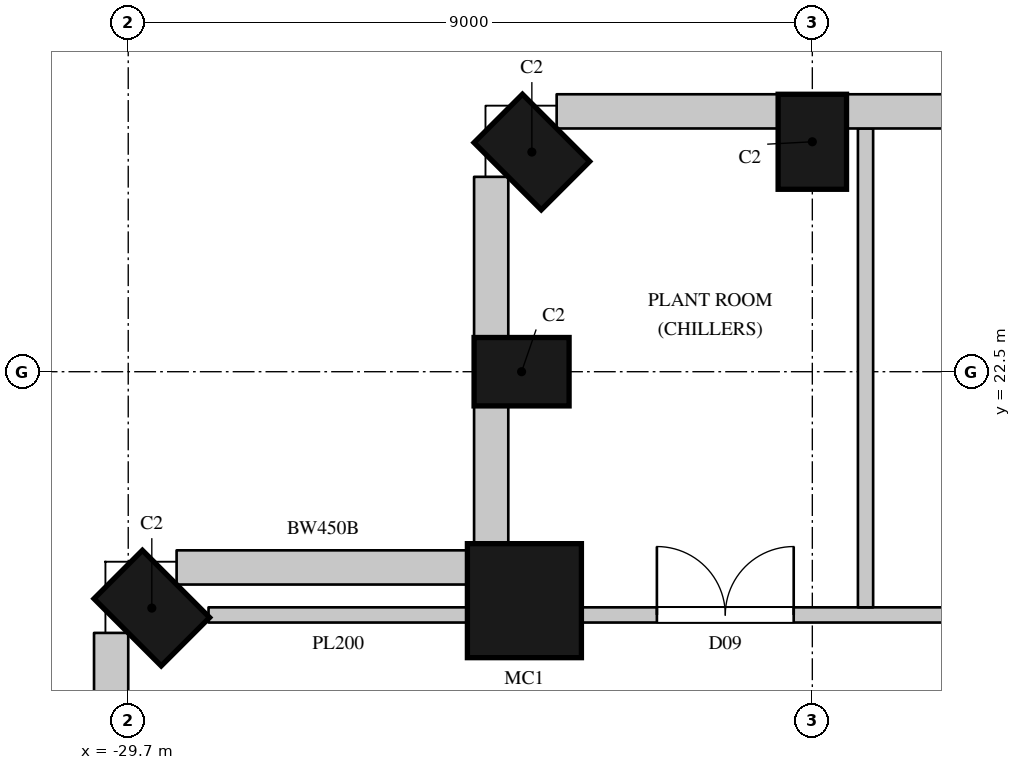
"""IFC4 building model, lengths in metres.
Left out: names, types, materials, properties, quantities, classifications, styles, units other than length and angle.
Written with IfcOpenShell. Run it as: python <this file> out.ifc"""

import sys

from ifc_helpers import new_model, si_unit, direction, frame, frame_2d, origin, origin_2d, place, context, subcontext, project, spatial, rectangle, circle, extrude, element, fill, save


model = new_model("IFC4")
c1 = context("Model", 3, precision=1e-05, world=origin(), true_north=direction((0.0, 1.0)))
c2 = subcontext(c1, "Body", "Model", "MODEL_VIEW")
j1 = project(units=[si_unit("LENGTHUNIT", "METRE"), si_unit("PLANEANGLEUNIT", "RADIAN")], contexts=[c1])
p1 = place(None, origin())
s1 = spatial("IfcSite", under=j1, at=p1, CompositionType="ELEMENT")
p2 = place(p1, origin())
s2 = spatial("IfcBuilding", under=s1, at=p2, CompositionType="ELEMENT")
p3 = place(p2, frame((0.0, 0.0, 152.5)))
s3 = spatial("IfcBuildingStorey", under=s2, at=p3, CompositionType="ELEMENT", Elevation=152.5)
for number, where, z_axis, x_axis in (
    (1, (-29.39, 19.39, 0.0), (0.0, 0.0, 1.0), (-0.707, -0.707, 0.0)),
    (2, (-20.7, 25.525, 0.0), (0.0, 0.0, 1.0), (-1.0, 0.0, 0.0)),
    (3, (-24.39, 25.39, 0.0), (0.0, 0.0, 1.0), (-0.707, -0.707, 0.0)),
    (4, (-24.525, 22.5, 0.0), (0.0, 0.0, 1.0), (0.0, -1.0, 0.0)),
):
    element("IfcColumn", number, at=place(p3, frame(where, z_axis=z_axis, x_axis=x_axis)), inside=s3, PredefinedType="COLUMN", context=c2, shape_type="SweptSolid", body=[
        extrude(rectangle(XDim=0.9, YDim=1.25, at=origin_2d()), origin(), (0.0, 0.0, 1.0), 8.0),
    ])
p4 = place(p3, frame((-24.488, 19.488, 0.0), z_axis=(0.0, 0.0, 1.0), x_axis=(1.0, 0.0, 0.0)))
e5 = element("IfcColumn", 5, at=p4, inside=s3, PredefinedType="COLUMN", context=c2, shape_type="SweptSolid", body=[
    extrude(circle(Radius=0.75, at=origin_2d()), origin(), (0.0, 0.0, 1.0), 8.0),
])
p5 = place(p3, frame((-29.925, 19.064, 0.0), z_axis=(0.0, 0.0, 1.0), x_axis=(0.0, -1.0, 0.0)))
e6 = element("IfcWall", 6, at=p5, inside=s3, PredefinedType="SOLIDWALL", context=c2, shape_type="SweptSolid", body=[
    extrude(rectangle(XDim=3.064, YDim=0.45, at=frame_2d((1.532, 0.0))), origin(), (0.0, 0.0, 1.0), 6.4),
])
p6 = place(p3, frame((-12.15, 25.925, 0.0), z_axis=(0.0, 0.0, 1.0), x_axis=(-1.0, 0.0, 0.0)))
e7 = element("IfcWall", 7, at=p6, inside=s3, PredefinedType="SOLIDWALL", context=c2, shape_type="SweptSolid", body=[
    extrude(rectangle(XDim=8.1, YDim=0.45, at=frame_2d((4.05, 0.0))), origin(), (0.0, 0.0, 1.0), 7.7),
])
p7 = place(p3, frame((-21.15, 25.925, 0.0), z_axis=(0.0, 0.0, 1.0), x_axis=(-1.0, 0.0, 0.0)))
e8 = element("IfcWall", 8, at=p7, inside=s3, PredefinedType="SOLIDWALL", context=c2, shape_type="SweptSolid", body=[
    extrude(rectangle(XDim=2.914, YDim=0.45, at=frame_2d((1.457, 0.0))), origin(), (0.0, 0.0, 1.0), 7.7),
])
p8 = place(p3, frame((-24.925, 25.064, 0.0), z_axis=(0.0, 0.0, 1.0), x_axis=(0.0, -1.0, 0.0)))
e9 = element("IfcWall", 9, at=p8, inside=s3, PredefinedType="SOLIDWALL", context=c2, shape_type="SweptSolid", body=[
    extrude(rectangle(XDim=2.114, YDim=0.45, at=frame_2d((1.057, 0.0))), origin(), (0.0, 0.0, 1.0), 7.7),
])
p9 = place(p3, frame((-24.925, 22.05, 0.0), z_axis=(0.0, 0.0, 1.0), x_axis=(0.0, -1.0, 0.0)))
e10 = element("IfcWall", 10, at=p9, inside=s3, PredefinedType="SOLIDWALL", context=c2, shape_type="SweptSolid", body=[
    extrude(rectangle(XDim=1.843, YDim=0.45, at=frame_2d((0.921, 0.0))), origin(), (0.0, 0.0, 1.0), 7.7),
])
p10 = place(p3, frame((-25.207, 19.925, 0.0), z_axis=(0.0, 0.0, 1.0), x_axis=(-1.0, 0.0, 0.0)))
e11 = element("IfcWall", 11, at=p10, inside=s3, PredefinedType="SOLIDWALL", context=c2, shape_type="SweptSolid", body=[
    extrude(rectangle(XDim=3.857, YDim=0.45, at=frame_2d((1.928, 0.0))), origin(), (0.0, 0.0, 1.0), 7.7),
])
p11 = place(p3, frame((-28.644, 19.3, 0.0), z_axis=(0.0, 0.0, 1.0), x_axis=(1.0, 0.0, 0.0)))
e12 = element("IfcWall", 12, at=p11, inside=s3, PredefinedType="PARTITIONING", context=c2, shape_type="SweptSolid", body=[
    extrude(rectangle(XDim=3.413, YDim=0.2, at=frame_2d((1.706, 0.0))), origin(), (0.0, 0.0, 1.0), 7.7),
])
p12 = place(p3, frame((-23.745, 19.3, 0.0), z_axis=(0.0, 0.0, 1.0), x_axis=(1.0, 0.0, 0.0)))
e13 = element("IfcWall", 13, at=p12, inside=s3, PredefinedType="PARTITIONING", context=c2, shape_type="SweptSolid", body=[
    extrude(rectangle(XDim=17.845, YDim=0.2, at=frame_2d((8.922, 0.0))), origin(), (0.0, 0.0, 1.0), 7.7),
])
p13 = place(p12, frame((1.0, 0.0, 0.0)))
e14 = element("IfcOpeningElement", 14, at=p13, cuts=e13, PredefinedType="OPENING", context=c2, shape_type="SweptSolid", body=[
    extrude(rectangle(XDim=1.8, YDim=2.4, at=frame_2d((0.9, 1.2))), frame((0.0, 0.11, 0.0), z_axis=(0.0, -1.0, 0.0), x_axis=(1.0, 0.0, 0.0)), (0.0, 0.0, 1.0), 0.22),
])
p14 = place(p12, frame((6.3, 0.0, 0.0)))
e15 = element("IfcOpeningElement", 15, at=p14, cuts=e13, PredefinedType="OPENING", context=c2, shape_type="SweptSolid", body=[
    extrude(rectangle(XDim=1.8, YDim=2.4, at=frame_2d((0.9, 1.2))), frame((0.0, 0.11, 0.0), z_axis=(0.0, -1.0, 0.0), x_axis=(1.0, 0.0, 0.0)), (0.0, 0.0, 1.0), 0.22),
])
p15 = place(p12, frame((13.3, 0.0, 0.0)))
e16 = element("IfcOpeningElement", 16, at=p15, cuts=e13, PredefinedType="OPENING", context=c2, shape_type="SweptSolid", body=[
    extrude(rectangle(XDim=1.8, YDim=2.4, at=frame_2d((0.9, 1.2))), frame((0.0, 0.11, 0.0), z_axis=(0.0, -1.0, 0.0), x_axis=(1.0, 0.0, 0.0)), (0.0, 0.0, 1.0), 0.22),
])
p16 = place(p3, frame((-20.0, 19.4, 0.0), z_axis=(0.0, 0.0, 1.0), x_axis=(0.0, 1.0, 0.0)))
e17 = element("IfcWall", 17, at=p16, inside=s3, PredefinedType="PARTITIONING", context=c2, shape_type="SweptSolid", body=[
    extrude(rectangle(XDim=6.3, YDim=0.2, at=frame_2d((3.15, 0.0))), origin(), (0.0, 0.0, 1.0), 6.4),
])
p17 = place(p13, origin())
e18 = element("IfcDoor", 18, at=p17, inside=s3, OperationType="DOUBLE_DOOR_SINGLE_SWING", PredefinedType="DOOR", context=c2, shape_type="SweptSolid", body=[
    extrude(rectangle(XDim=1.8, YDim=2.4, at=frame_2d((0.9, 1.2))), frame((0.0, 0.025, 0.0), z_axis=(0.0, -1.0, 0.0), x_axis=(1.0, 0.0, 0.0)), (0.0, 0.0, 1.0), 0.05),
])
fill(e14, e18)
save(model, sys.argv[1])
